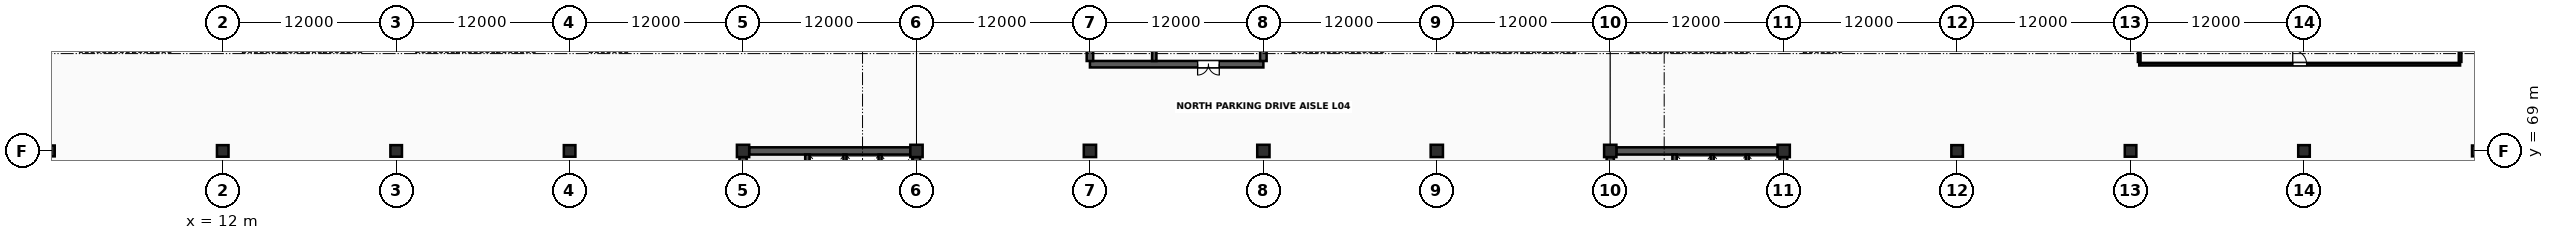
"""IFC4 building model, lengths in metres.
Left out: names, types, materials, properties, quantities, classifications, styles, units other than length and angle.
Written with IfcOpenShell. Run it as: python <this file> out.ifc"""

import sys

from ifc_helpers import new_model, si_unit, direction, frame, frame_2d, origin, origin_2d, place, context, subcontext, project, spatial, rectangle, extrude, element, fill, save


model = new_model("IFC4")
c1 = context("Model", 3, precision=1e-05, world=origin(), true_north=direction((0.0, 1.0)))
c2 = subcontext(c1, "Body", "Model", "MODEL_VIEW")
j1 = project(units=[si_unit("LENGTHUNIT", "METRE"), si_unit("PLANEANGLEUNIT", "RADIAN")], contexts=[c1])
p1 = place(None, origin())
s1 = spatial("IfcSite", under=j1, at=p1, CompositionType="ELEMENT")
p2 = place(p1, origin())
s2 = spatial("IfcBuilding", under=s1, at=p2, CompositionType="ELEMENT")
p3 = place(p2, frame((0.0, 0.0, 17.2)))
s3 = spatial("IfcBuildingStorey", under=s2, at=p3, CompositionType="ELEMENT", Elevation=17.2)
p4 = place(p3, frame((0.0, 69.0, 0.0), z_axis=(0.0, 0.0, 1.0), x_axis=(1.0, 0.0, 0.0)))
e1 = element("IfcColumn", 1, at=p4, inside=s3, PredefinedType="COLUMN", context=c2, shape_type="SweptSolid", body=[
    extrude(rectangle(XDim=0.75, YDim=0.75, at=origin_2d()), origin(), (0.0, 0.0, 1.0), 3.8),
])
for number, where, z_axis, x_axis in (
    (2, (12.0, 69.0, 0.0), (0.0, 0.0, 1.0), (1.0, 0.0, 0.0)),
    (3, (24.0, 69.0, 0.0), (0.0, 0.0, 1.0), (1.0, 0.0, 0.0)),
    (4, (36.0, 69.0, 0.0), (0.0, 0.0, 1.0), (1.0, 0.0, 0.0)),
):
    element("IfcColumn", number, at=place(p3, frame(where, z_axis=z_axis, x_axis=x_axis)), inside=s3, PredefinedType="COLUMN", context=c2, shape_type="SweptSolid", body=[
        extrude(rectangle(XDim=0.8, YDim=0.8, at=origin_2d()), origin(), (0.0, 0.0, 1.0), 3.8),
    ])
for number, where, z_axis, x_axis in (
    (5, (48.0, 69.0, 0.0), (0.0, 0.0, 1.0), (1.0, 0.0, 0.0)),
    (6, (60.0, 69.0, 0.0), (0.0, 0.0, 1.0), (1.0, 0.0, 0.0)),
    (7, (72.0, 69.0, 0.0), (0.0, 0.0, 1.0), (1.0, 0.0, 0.0)),
    (8, (84.0, 69.0, 0.0), (0.0, 0.0, 1.0), (1.0, 0.0, 0.0)),
    (9, (96.0, 69.0, 0.0), (0.0, 0.0, 1.0), (1.0, 0.0, 0.0)),
    (10, (108.0, 69.0, 0.0), (0.0, 0.0, 1.0), (1.0, 0.0, 0.0)),
    (11, (120.0, 69.0, 0.0), (0.0, 0.0, 1.0), (1.0, 0.0, 0.0)),
):
    element("IfcColumn", number, at=place(p3, frame(where, z_axis=z_axis, x_axis=x_axis)), inside=s3, PredefinedType="COLUMN", context=c2, shape_type="SweptSolid", body=[
        extrude(rectangle(XDim=0.85, YDim=0.85, at=origin_2d()), origin(), (0.0, 0.0, 1.0), 3.8),
    ])
for number, where, z_axis, x_axis in (
    (12, (132.0, 69.0, 0.0), (0.0, 0.0, 1.0), (1.0, 0.0, 0.0)),
    (13, (144.0, 69.0, 0.0), (0.0, 0.0, 1.0), (1.0, 0.0, 0.0)),
    (14, (156.0, 69.0, 0.0), (0.0, 0.0, 1.0), (1.0, 0.0, 0.0)),
):
    element("IfcColumn", number, at=place(p3, frame(where, z_axis=z_axis, x_axis=x_axis)), inside=s3, PredefinedType="COLUMN", context=c2, shape_type="SweptSolid", body=[
        extrude(rectangle(XDim=0.8, YDim=0.8, at=origin_2d()), origin(), (0.0, 0.0, 1.0), 3.8),
    ])
p5 = place(p3, frame((168.0, 69.0, 0.0), z_axis=(0.0, 0.0, 1.0), x_axis=(1.0, 0.0, 0.0)))
e15 = element("IfcColumn", 15, at=p5, inside=s3, PredefinedType="COLUMN", context=c2, shape_type="SweptSolid", body=[
    extrude(rectangle(XDim=0.75, YDim=0.75, at=origin_2d()), origin(), (0.0, 0.0, 1.0), 3.8),
])
for number, where, z_axis, x_axis in (
    (16, (48.422, 69.0, 0.0), (0.0, 0.0, 1.0), (1.0, 0.0, 0.0)),
    (17, (48.0, 57.422, 0.0), (0.0, 0.0, 1.0), (0.0, 1.0, 0.0)),
    (18, (60.0, 57.422, 0.0), (0.0, 0.0, 1.0), (0.0, 1.0, 0.0)),
):
    element("IfcWall", number, at=place(p3, frame(where, z_axis=z_axis, x_axis=x_axis)), inside=s3, PredefinedType="SHEAR", context=c2, shape_type="SweptSolid", body=[
        extrude(rectangle(XDim=11.156, YDim=0.5, at=frame_2d((5.578, 0.0))), origin(), (0.0, 0.0, 1.0), 3.643),
    ])
p6 = place(p3, frame((52.45, 57.247, 0.0), z_axis=(0.0, 0.0, 1.0), x_axis=(0.0, 1.0, 0.0)))
e19 = element("IfcWall", 19, at=p6, inside=s3, PredefinedType="SHEAR", context=c2, shape_type="SweptSolid", body=[
    extrude(rectangle(XDim=11.506, YDim=0.3, at=frame_2d((5.753, 0.0))), origin(), (0.0, 0.0, 1.0), 3.643),
])
p7 = place(p6, frame((0.9, 0.0, 0.0)))
e20 = element("IfcOpeningElement", 20, at=p7, cuts=e19, PredefinedType="OPENING", context=c2, shape_type="SweptSolid", body=[
    extrude(rectangle(XDim=1.1, YDim=2.2, at=frame_2d((0.55, 1.1))), frame((0.0, 0.165, 0.0), z_axis=(0.0, -1.0, 0.0), x_axis=(1.0, 0.0, 0.0)), (0.0, 0.0, 1.0), 0.33),
])
for number, where, z_axis, x_axis in (
    (21, (55.05, 65.92, 0.0), (0.0, 0.0, 1.0), (0.0, 1.0, 0.0)),
    (22, (57.48, 65.92, 0.0), (0.0, 0.0, 1.0), (0.0, 1.0, 0.0)),
):
    element("IfcWall", number, at=place(p3, frame(where, z_axis=z_axis, x_axis=x_axis)), inside=s3, PredefinedType="SOLIDWALL", context=c2, shape_type="SweptSolid", body=[
        extrude(rectangle(XDim=2.83, YDim=0.2, at=frame_2d((1.415, 0.0))), origin(), (0.0, 0.0, 1.0), 3.633),
    ])
for number, where, z_axis, x_axis in (
    (23, (108.422, 69.0, 0.0), (0.0, 0.0, 1.0), (1.0, 0.0, 0.0)),
    (24, (108.0, 57.422, 0.0), (0.0, 0.0, 1.0), (0.0, 1.0, 0.0)),
    (25, (120.0, 57.422, 0.0), (0.0, 0.0, 1.0), (0.0, 1.0, 0.0)),
):
    element("IfcWall", number, at=place(p3, frame(where, z_axis=z_axis, x_axis=x_axis)), inside=s3, PredefinedType="SHEAR", context=c2, shape_type="SweptSolid", body=[
        extrude(rectangle(XDim=11.156, YDim=0.5, at=frame_2d((5.578, 0.0))), origin(), (0.0, 0.0, 1.0), 3.643),
    ])
p8 = place(p3, frame((112.45, 57.247, 0.0), z_axis=(0.0, 0.0, 1.0), x_axis=(0.0, 1.0, 0.0)))
e26 = element("IfcWall", 26, at=p8, inside=s3, PredefinedType="SHEAR", context=c2, shape_type="SweptSolid", body=[
    extrude(rectangle(XDim=11.506, YDim=0.3, at=frame_2d((5.753, 0.0))), origin(), (0.0, 0.0, 1.0), 3.643),
])
p9 = place(p8, frame((0.9, 0.0, 0.0)))
e27 = element("IfcOpeningElement", 27, at=p9, cuts=e26, PredefinedType="OPENING", context=c2, shape_type="SweptSolid", body=[
    extrude(rectangle(XDim=1.1, YDim=2.2, at=frame_2d((0.55, 1.1))), frame((0.0, 0.165, 0.0), z_axis=(0.0, -1.0, 0.0), x_axis=(1.0, 0.0, 0.0)), (0.0, 0.0, 1.0), 0.33),
])
for number, where, z_axis, x_axis in (
    (28, (115.05, 65.92, 0.0), (0.0, 0.0, 1.0), (0.0, 1.0, 0.0)),
    (29, (117.48, 65.92, 0.0), (0.0, 0.0, 1.0), (0.0, 1.0, 0.0)),
):
    element("IfcWall", number, at=place(p3, frame(where, z_axis=z_axis, x_axis=x_axis)), inside=s3, PredefinedType="SOLIDWALL", context=c2, shape_type="SweptSolid", body=[
        extrude(rectangle(XDim=2.83, YDim=0.2, at=frame_2d((1.415, 0.0))), origin(), (0.0, 0.0, 1.0), 3.633),
    ])
p10 = place(p3, frame((72.0, 75.0, 0.0), z_axis=(0.0, 0.0, 1.0), x_axis=(1.0, 0.0, 0.0)))
e30 = element("IfcWall", 30, at=p10, inside=s3, PredefinedType="SHEAR", context=c2, shape_type="SweptSolid", body=[
    extrude(rectangle(XDim=12.0, YDim=0.45, at=frame_2d((6.0, 0.0))), origin(), (0.0, 0.0, 1.0), 3.643),
])
p11 = place(p10, frame((7.45, 0.0, 0.0)))
e31 = element("IfcOpeningElement", 31, at=p11, cuts=e30, PredefinedType="OPENING", context=c2, shape_type="SweptSolid", body=[
    extrude(rectangle(XDim=1.5, YDim=2.25, at=frame_2d((0.75, 1.125))), frame((0.0, 0.24, 0.0), z_axis=(0.0, -1.0, 0.0), x_axis=(1.0, 0.0, 0.0)), (0.0, 0.0, 1.0), 0.48),
])
for number, where, z_axis, x_axis in (
    (32, (72.0, 75.222, 0.0), (0.0, 0.0, 1.0), (0.0, 1.0, 0.0)),
    (33, (84.0, 75.222, 0.0), (0.0, 0.0, 1.0), (0.0, 1.0, 0.0)),
):
    element("IfcWall", number, at=place(p3, frame(where, z_axis=z_axis, x_axis=x_axis)), inside=s3, PredefinedType="SHEAR", context=c2, shape_type="SweptSolid", body=[
        extrude(rectangle(XDim=11.381, YDim=0.45, at=frame_2d((5.69, 0.0))), origin(), (0.0, 0.0, 1.0), 3.643),
    ])
p12 = place(p3, frame((76.45, 75.222, 0.0), z_axis=(0.0, 0.0, 1.0), x_axis=(0.0, 1.0, 0.0)))
e34 = element("IfcWall", 34, at=p12, inside=s3, PredefinedType="SHEAR", context=c2, shape_type="SweptSolid", body=[
    extrude(rectangle(XDim=11.556, YDim=0.3, at=frame_2d((5.778, 0.0))), origin(), (0.0, 0.0, 1.0), 3.643),
])
p13 = place(p12, frame((0.9, 0.0, 0.0)))
e35 = element("IfcOpeningElement", 35, at=p13, cuts=e34, PredefinedType="OPENING", context=c2, shape_type="SweptSolid", body=[
    extrude(rectangle(XDim=1.1, YDim=2.2, at=frame_2d((0.55, 1.1))), frame((0.0, 0.165, 0.0), z_axis=(0.0, -1.0, 0.0), x_axis=(1.0, 0.0, 0.0)), (0.0, 0.0, 1.0), 0.33),
])
p14 = place(p3, frame((144.6, 75.0, 0.0), z_axis=(0.0, 0.0, 1.0), x_axis=(1.0, 0.0, 0.0)))
e36 = element("IfcWall", 36, at=p14, inside=s3, PredefinedType="SOLIDWALL", context=c2, shape_type="SweptSolid", body=[
    extrude(rectangle(XDim=22.2, YDim=0.18, at=frame_2d((11.1, 0.0))), origin(), (0.0, 0.0, 1.0), 2.75),
])
p15 = place(p14, frame((10.62, 0.0, 0.0)))
e37 = element("IfcOpeningElement", 37, at=p15, cuts=e36, PredefinedType="OPENING", context=c2, shape_type="SweptSolid", body=[
    extrude(rectangle(XDim=0.96, YDim=2.12, at=frame_2d((0.48, 1.06))), frame((0.0, 0.105, 0.0), z_axis=(0.0, -1.0, 0.0), x_axis=(1.0, 0.0, 0.0)), (0.0, 0.0, 1.0), 0.21),
])
for number, where, z_axis, x_axis in (
    (38, (144.6, 75.16, 0.0), (0.0, 0.0, 1.0), (0.0, 1.0, 0.0)),
    (39, (166.8, 75.16, 0.0), (0.0, 0.0, 1.0), (0.0, 1.0, 0.0)),
):
    element("IfcWall", number, at=place(p3, frame(where, z_axis=z_axis, x_axis=x_axis)), inside=s3, PredefinedType="SOLIDWALL", context=c2, shape_type="SweptSolid", body=[
        extrude(rectangle(XDim=16.68, YDim=0.18, at=frame_2d((8.34, 0.0))), origin(), (0.0, 0.0, 1.0), 2.75),
    ])
p16 = place(p11, origin())
e40 = element("IfcDoor", 40, at=p16, inside=s3, OperationType="DOUBLE_DOOR_SINGLE_SWING", PredefinedType="DOOR", context=c2, shape_type="SweptSolid", body=[
    extrude(rectangle(XDim=1.5, YDim=2.25, at=frame_2d((0.75, 1.125))), frame((0.0, 0.025, 0.0), z_axis=(0.0, -1.0, 0.0), x_axis=(1.0, 0.0, 0.0)), (0.0, 0.0, 1.0), 0.05),
])
fill(e31, e40)
p17 = place(p15, origin())
e41 = element("IfcDoor", 41, at=p17, inside=s3, OperationType="SINGLE_SWING_LEFT", PredefinedType="DOOR", context=c2, shape_type="SweptSolid", body=[
    extrude(rectangle(XDim=0.96, YDim=2.12, at=frame_2d((0.48, 1.06))), frame((0.0, 0.025, 0.0), z_axis=(0.0, -1.0, 0.0), x_axis=(1.0, 0.0, 0.0)), (0.0, 0.0, 1.0), 0.05),
])
fill(e37, e41)
save(model, sys.argv[1])
